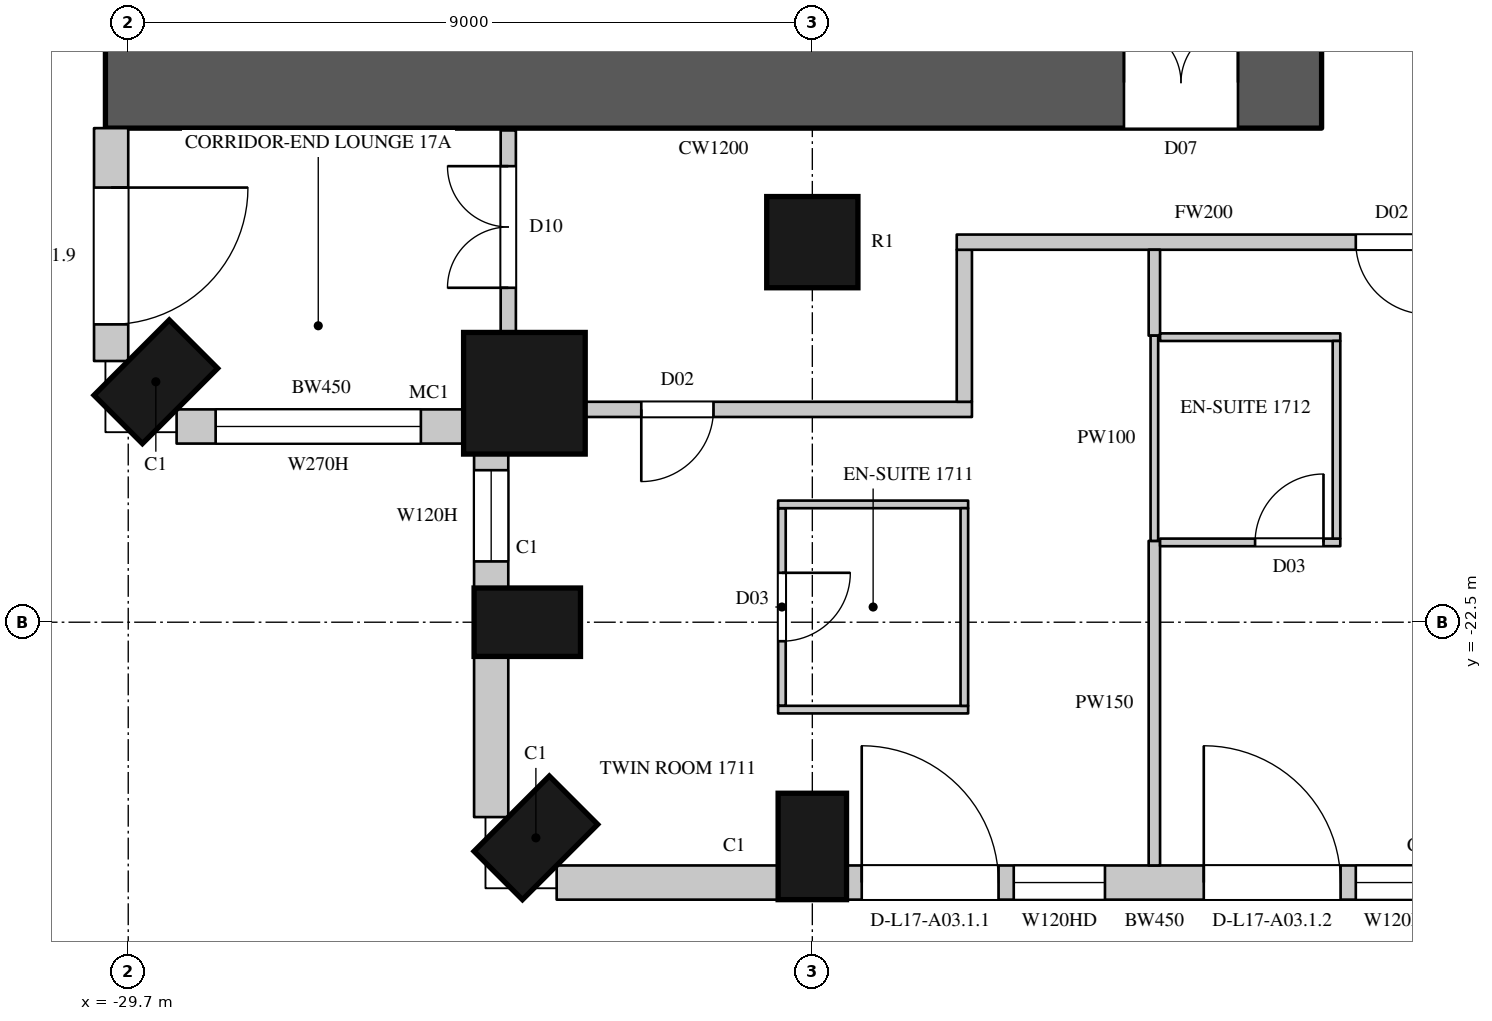
"""IFC4 building model, lengths in metres.
Left out: names, types, materials, properties, quantities, classifications, styles, units other than length and angle.
Written with IfcOpenShell. Run it as: python <this file> out.ifc"""

import sys

from ifc_helpers import new_model, si_unit, direction, frame, frame_2d, origin, origin_2d, place, context, subcontext, project, spatial, rectangle, circle, extrude, element, fill, save


model = new_model("IFC4")
c1 = context("Model", 3, precision=1e-05, world=origin(), true_north=direction((0.0, 1.0)))
c2 = subcontext(c1, "Body", "Model", "MODEL_VIEW")
j1 = project(units=[si_unit("LENGTHUNIT", "METRE"), si_unit("PLANEANGLEUNIT", "RADIAN")], contexts=[c1])
p1 = place(None, origin())
s1 = spatial("IfcSite", under=j1, at=p1, CompositionType="ELEMENT")
p2 = place(p1, origin())
s2 = spatial("IfcBuilding", under=s1, at=p2, CompositionType="ELEMENT")
p3 = place(p2, frame((0.0, 0.0, 91.5)))
s3 = spatial("IfcBuildingStorey", under=s2, at=p3, CompositionType="ELEMENT", Elevation=91.5)
p4 = place(p3, frame((-29.337, -19.337, 0.0), z_axis=(0.0, 0.0, 1.0), x_axis=(0.707106781187, -0.707106781187, 0.0)))
e1 = element("IfcColumn", 1, at=p4, inside=s3, PredefinedType="COLUMN", context=c2, shape_type="SweptSolid", body=[
    extrude(rectangle(XDim=0.9, YDim=1.4, at=origin_2d()), origin(), (0.0, 0.0, 1.0), 3.6),
])
p5 = place(p3, frame((-24.488, -19.488, 0.0), z_axis=(0.0, 0.0, 1.0), x_axis=(1.0, 0.0, 0.0)))
e2 = element("IfcColumn", 2, at=p5, inside=s3, PredefinedType="COLUMN", context=c2, shape_type="SweptSolid", body=[
    extrude(circle(Radius=0.8, at=origin_2d()), origin(), (0.0, 0.0, 1.0), 3.6),
])
for number, where, z_axis, x_axis in (
    (3, (-24.45, -22.5, 0.0), (0.0, 0.0, 1.0), (0.0, -1.0, 0.0)),
    (4, (-24.337, -25.337, 0.0), (0.0, 0.0, 1.0), (0.707, -0.707, 0.0)),
    (5, (-20.7, -25.45, 0.0), (0.0, 0.0, 1.0), (1.0, 0.0, 0.0)),
):
    element("IfcColumn", number, at=place(p3, frame(where, z_axis=z_axis, x_axis=x_axis)), inside=s3, PredefinedType="COLUMN", context=c2, shape_type="SweptSolid", body=[
        extrude(rectangle(XDim=0.9, YDim=1.4, at=origin_2d()), origin(), (0.0, 0.0, 1.0), 3.6),
    ])
p6 = place(p3, frame((-20.7, -17.5, 0.0), z_axis=(0.0, 0.0, 1.0), x_axis=(1.0, 0.0, 0.0)))
e6 = element("IfcColumn", 6, at=p6, inside=s3, PredefinedType="COLUMN", context=c2, shape_type="SweptSolid", body=[
    extrude(circle(Radius=0.6, at=origin_2d()), origin(), (0.0, 0.0, 1.0), 3.6),
])
p7 = place(p3, frame((-29.925, -16.0, 0.0), z_axis=(0.0, 0.0, 1.0), x_axis=(0.0, -1.0, 0.0)))
e7 = element("IfcWall", 7, at=p7, inside=s3, PredefinedType="SOLIDWALL", context=c2, shape_type="SweptSolid", body=[
    extrude(rectangle(XDim=3.064, YDim=0.45, at=frame_2d((1.532, 0.0))), origin(), (0.0, 0.0, 1.0), 3.3),
])
p8 = place(p7, frame((0.782, 0.0, 0.0)))
e8 = element("IfcOpeningElement", 8, at=p8, cuts=e7, PredefinedType="OPENING", context=c2, shape_type="SweptSolid", body=[
    extrude(rectangle(XDim=1.8, YDim=2.4, at=frame_2d((0.9, 1.2))), frame((0.0, 0.235, 0.0), z_axis=(0.0, -1.0, 0.0), x_axis=(1.0, 0.0, 0.0)), (0.0, 0.0, 1.0), 0.47),
])
p9 = place(p3, frame((-29.064, -19.925, 0.0), z_axis=(0.0, 0.0, 1.0), x_axis=(1.0, 0.0, 0.0)))
e9 = element("IfcWall", 9, at=p9, inside=s3, PredefinedType="SOLIDWALL", context=c2, shape_type="SweptSolid", body=[
    extrude(rectangle(XDim=3.805, YDim=0.45, at=frame_2d((1.903, 0.0))), origin(), (0.0, 0.0, 1.0), 3.3),
])
p10 = place(p9, frame((0.514, 0.0, 1.05)))
e10 = element("IfcOpeningElement", 10, at=p10, cuts=e9, PredefinedType="OPENING", context=c2, shape_type="SweptSolid", body=[
    extrude(rectangle(XDim=2.7, YDim=2.0, at=frame_2d((1.35, 1.0))), frame((0.0, 0.235, 0.0), z_axis=(0.0, -1.0, 0.0), x_axis=(1.0, 0.0, 0.0)), (0.0, 0.0, 1.0), 0.47),
])
p11 = place(p3, frame((-24.925, -20.259, 0.0), z_axis=(0.0, 0.0, 1.0), x_axis=(0.0, -1.0, 0.0)))
e11 = element("IfcWall", 11, at=p11, inside=s3, PredefinedType="SOLIDWALL", context=c2, shape_type="SweptSolid", body=[
    extrude(rectangle(XDim=1.792, YDim=0.45, at=frame_2d((0.896, 0.0))), origin(), (0.0, 0.0, 1.0), 3.3),
])
p12 = place(p11, frame((0.241, 0.0, 1.05)))
e12 = element("IfcOpeningElement", 12, at=p12, cuts=e11, PredefinedType="OPENING", context=c2, shape_type="SweptSolid", body=[
    extrude(rectangle(XDim=1.2, YDim=2.0, at=frame_2d((0.6, 1.0))), frame((0.0, 0.235, 0.0), z_axis=(0.0, -1.0, 0.0), x_axis=(1.0, 0.0, 0.0)), (0.0, 0.0, 1.0), 0.47),
])
p13 = place(p3, frame((-24.925, -22.95, 0.0), z_axis=(0.0, 0.0, 1.0), x_axis=(0.0, -1.0, 0.0)))
e13 = element("IfcWall", 13, at=p13, inside=s3, PredefinedType="SOLIDWALL", context=c2, shape_type="SweptSolid", body=[
    extrude(rectangle(XDim=2.114, YDim=0.45, at=frame_2d((1.057, 0.0))), origin(), (0.0, 0.0, 1.0), 3.3),
])
p14 = place(p3, frame((-24.064, -25.925, 0.0), z_axis=(0.0, 0.0, 1.0), x_axis=(1.0, 0.0, 0.0)))
e14 = element("IfcWall", 14, at=p14, inside=s3, PredefinedType="SOLIDWALL", context=c2, shape_type="SweptSolid", body=[
    extrude(rectangle(XDim=2.914, YDim=0.45, at=frame_2d((1.457, 0.0))), origin(), (0.0, 0.0, 1.0), 3.3),
])
p15 = place(p3, frame((-20.25, -25.925, 0.0), z_axis=(0.0, 0.0, 1.0), x_axis=(1.0, 0.0, 0.0)))
e15 = element("IfcWall", 15, at=p15, inside=s3, PredefinedType="SOLIDWALL", context=c2, shape_type="SweptSolid", body=[
    extrude(rectangle(XDim=8.1, YDim=0.45, at=frame_2d((4.05, 0.0))), origin(), (0.0, 0.0, 1.0), 3.3),
])
p16 = place(p15, frame((0.2, 0.0, 0.0)))
e16 = element("IfcOpeningElement", 16, at=p16, cuts=e15, PredefinedType="OPENING", context=c2, shape_type="SweptSolid", body=[
    extrude(rectangle(XDim=1.8, YDim=2.4, at=frame_2d((0.9, 1.2))), frame((0.0, 0.235, 0.0), z_axis=(0.0, -1.0, 0.0), x_axis=(1.0, 0.0, 0.0)), (0.0, 0.0, 1.0), 0.47),
])
p17 = place(p15, frame((2.2, 0.0, 1.05)))
e17 = element("IfcOpeningElement", 17, at=p17, cuts=e15, PredefinedType="OPENING", context=c2, shape_type="SweptSolid", body=[
    extrude(rectangle(XDim=1.2, YDim=2.0, at=frame_2d((0.6, 1.0))), frame((0.0, 0.235, 0.0), z_axis=(0.0, -1.0, 0.0), x_axis=(1.0, 0.0, 0.0)), (0.0, 0.0, 1.0), 0.47),
])
p18 = place(p15, frame((4.7, 0.0, 0.0)))
e18 = element("IfcOpeningElement", 18, at=p18, cuts=e15, PredefinedType="OPENING", context=c2, shape_type="SweptSolid", body=[
    extrude(rectangle(XDim=1.8, YDim=2.4, at=frame_2d((0.9, 1.2))), frame((0.0, 0.235, 0.0), z_axis=(0.0, -1.0, 0.0), x_axis=(1.0, 0.0, 0.0)), (0.0, 0.0, 1.0), 0.47),
])
p19 = place(p15, frame((6.7, 0.0, 1.05)))
e19 = element("IfcOpeningElement", 19, at=p19, cuts=e15, PredefinedType="OPENING", context=c2, shape_type="SweptSolid", body=[
    extrude(rectangle(XDim=1.2, YDim=2.0, at=frame_2d((0.6, 1.0))), frame((0.0, 0.235, 0.0), z_axis=(0.0, -1.0, 0.0), x_axis=(1.0, 0.0, 0.0)), (0.0, 0.0, 1.0), 0.47),
])
p20 = place(p3, frame((-30.0, -15.4, 0.0), z_axis=(0.0, 0.0, 1.0), x_axis=(1.0, 0.0, 0.0)))
e20 = element("IfcWall", 20, at=p20, inside=s3, PredefinedType="SHEAR", context=c2, shape_type="SweptSolid", body=[
    extrude(rectangle(XDim=16.0, YDim=1.2, at=frame_2d((8.0, 0.0))), origin(), (0.0, 0.0, 1.0), 3.6),
])
p21 = place(p20, frame((13.4, 0.0, 0.0)))
e21 = element("IfcOpeningElement", 21, at=p21, cuts=e20, PredefinedType="OPENING", context=c2, shape_type="SweptSolid", body=[
    extrude(rectangle(XDim=1.5, YDim=2.4, at=frame_2d((0.75, 1.2))), frame((0.0, 0.61, 0.0), z_axis=(0.0, -1.0, 0.0), x_axis=(1.0, 0.0, 0.0)), (0.0, 0.0, 1.0), 1.22),
])
p22 = place(p3, frame((-24.7, -18.7, 0.0), z_axis=(0.0, 0.0, 1.0), x_axis=(0.0, 1.0, 0.0)))
e22 = element("IfcWall", 22, at=p22, inside=s3, PredefinedType="PARTITIONING", context=c2, shape_type="SweptSolid", body=[
    extrude(rectangle(XDim=2.67, YDim=0.2, at=frame_2d((1.335, 0.0))), origin(), (0.0, 0.0, 1.0), 3.3),
])
p23 = place(p22, frame((0.6, 0.0, 0.0)))
e23 = element("IfcOpeningElement", 23, at=p23, cuts=e22, PredefinedType="OPENING", context=c2, shape_type="SweptSolid", body=[
    extrude(rectangle(XDim=1.6, YDim=2.4, at=frame_2d((0.8, 1.2))), frame((0.0, 0.11, 0.0), z_axis=(0.0, -1.0, 0.0), x_axis=(1.0, 0.0, 0.0)), (0.0, 0.0, 1.0), 0.22),
])
p24 = place(p3, frame((-23.7, -19.7, 0.0), z_axis=(0.0, 0.0, 1.0), x_axis=(1.0, 0.0, 0.0)))
e24 = element("IfcWall", 24, at=p24, inside=s3, PredefinedType="PARTITIONING", context=c2, shape_type="SweptSolid", body=[
    extrude(rectangle(XDim=5.1, YDim=0.2, at=frame_2d((2.55, 0.0))), origin(), (0.0, 0.0, 1.0), 3.3),
])
p25 = place(p24, frame((0.75, 0.0, 0.0)))
e25 = element("IfcOpeningElement", 25, at=p25, cuts=e24, PredefinedType="OPENING", context=c2, shape_type="SweptSolid", body=[
    extrude(rectangle(XDim=0.95, YDim=2.2, at=frame_2d((0.475, 1.1))), frame((0.0, 0.11, 0.0), z_axis=(0.0, -1.0, 0.0), x_axis=(1.0, 0.0, 0.0)), (0.0, 0.0, 1.0), 0.22),
])
p26 = place(p3, frame((-18.7, -19.6, 0.0), z_axis=(0.0, 0.0, 1.0), x_axis=(0.0, 1.0, 0.0)))
e26 = element("IfcWall", 26, at=p26, inside=s3, PredefinedType="PARTITIONING", context=c2, shape_type="SweptSolid", body=[
    extrude(rectangle(XDim=2.0, YDim=0.2, at=frame_2d((1.0, 0.0))), origin(), (0.0, 0.0, 1.0), 3.3),
])
p27 = place(p3, frame((-18.8, -17.5, 0.0), z_axis=(0.0, 0.0, 1.0), x_axis=(1.0, 0.0, 0.0)))
e27 = element("IfcWall", 27, at=p27, inside=s3, PredefinedType="PARTITIONING", context=c2, shape_type="SweptSolid", body=[
    extrude(rectangle(XDim=6.5, YDim=0.2, at=frame_2d((3.25, 0.0))), origin(), (0.0, 0.0, 1.0), 2.75),
])
p28 = place(p27, frame((5.25, 0.0, 0.0)))
e28 = element("IfcOpeningElement", 28, at=p28, cuts=e27, PredefinedType="OPENING", context=c2, shape_type="SweptSolid", body=[
    extrude(rectangle(XDim=0.95, YDim=2.2, at=frame_2d((0.475, 1.1))), frame((0.0, 0.11, 0.0), z_axis=(0.0, -1.0, 0.0), x_axis=(1.0, 0.0, 0.0)), (0.0, 0.0, 1.0), 0.22),
])
p29 = place(p3, frame((-16.2, -25.7, 0.0), z_axis=(0.0, 0.0, 1.0), x_axis=(0.0, 1.0, 0.0)))
e29 = element("IfcWall", 29, at=p29, inside=s3, PredefinedType="PARTITIONING", context=c2, shape_type="SweptSolid", body=[
    extrude(rectangle(XDim=4.27, YDim=0.15, at=frame_2d((2.135, 0.0))), origin(), (0.0, 0.0, 1.0), 2.65),
])
p30 = place(p3, frame((-16.2, -18.73, 0.0), z_axis=(0.0, 0.0, 1.0), x_axis=(0.0, 1.0, 0.0)))
e30 = element("IfcWall", 30, at=p30, inside=s3, PredefinedType="PARTITIONING", context=c2, shape_type="SweptSolid", body=[
    extrude(rectangle(XDim=1.13, YDim=0.15, at=frame_2d((0.565, 0.0))), origin(), (0.0, 0.0, 1.0), 2.65),
])
p31 = place(p3, frame((-21.1, -23.6, 0.0), z_axis=(0.0, 0.0, 1.0), x_axis=(0.0, 1.0, 0.0)))
e31 = element("IfcWall", 31, at=p31, inside=s3, PredefinedType="PARTITIONING", context=c2, shape_type="SweptSolid", body=[
    extrude(rectangle(XDim=2.6, YDim=0.1, at=frame_2d((1.3, 0.0))), origin(), (0.0, 0.0, 1.0), 3.3),
])
p32 = place(p31, frame((0.85, 0.0, 0.0)))
e32 = element("IfcOpeningElement", 32, at=p32, cuts=e31, PredefinedType="OPENING", context=c2, shape_type="SweptSolid", body=[
    extrude(rectangle(XDim=0.9, YDim=2.2, at=frame_2d((0.45, 1.1))), frame((0.0, 0.06, 0.0), z_axis=(0.0, -1.0, 0.0), x_axis=(1.0, 0.0, 0.0)), (0.0, 0.0, 1.0), 0.12),
])
for number, where, z_axis, x_axis in (
    (33, (-21.15, -23.65, 0.0), (0.0, 0.0, 1.0), (1.0, 0.0, 0.0)),
    (34, (-21.15, -20.95, 0.0), (0.0, 0.0, 1.0), (1.0, 0.0, 0.0)),
):
    element("IfcWall", number, at=place(p3, frame(where, z_axis=z_axis, x_axis=x_axis)), inside=s3, PredefinedType="PARTITIONING", context=c2, shape_type="SweptSolid", body=[
        extrude(rectangle(XDim=2.5, YDim=0.1, at=frame_2d((1.25, 0.0))), origin(), (0.0, 0.0, 1.0), 3.3),
    ])
p33 = place(p3, frame((-18.7, -23.6, 0.0), z_axis=(0.0, 0.0, 1.0), x_axis=(0.0, 1.0, 0.0)))
e35 = element("IfcWall", 35, at=p33, inside=s3, PredefinedType="PARTITIONING", context=c2, shape_type="SweptSolid", body=[
    extrude(rectangle(XDim=2.6, YDim=0.1, at=frame_2d((1.3, 0.0))), origin(), (0.0, 0.0, 1.0), 3.3),
])
p34 = place(p3, frame((-16.2, -21.43, 0.0), z_axis=(0.0, 0.0, 1.0), x_axis=(0.0, 1.0, 0.0)))
e36 = element("IfcWall", 36, at=p34, inside=s3, PredefinedType="PARTITIONING", context=c2, shape_type="SweptSolid", body=[
    extrude(rectangle(XDim=2.7, YDim=0.1, at=frame_2d((1.35, 0.0))), origin(), (0.0, 0.0, 1.0), 2.65),
])
p35 = place(p3, frame((-16.125, -21.45, 0.0), z_axis=(0.0, 0.0, 1.0), x_axis=(1.0, 0.0, 0.0)))
e37 = element("IfcWall", 37, at=p35, inside=s3, PredefinedType="PARTITIONING", context=c2, shape_type="SweptSolid", body=[
    extrude(rectangle(XDim=2.371, YDim=0.1, at=frame_2d((1.186, 0.0))), origin(), (0.0, 0.0, 1.0), 3.3),
])
p36 = place(p35, frame((1.25, 0.0, 0.0)))
e38 = element("IfcOpeningElement", 38, at=p36, cuts=e37, PredefinedType="OPENING", context=c2, shape_type="SweptSolid", body=[
    extrude(rectangle(XDim=0.9, YDim=2.2, at=frame_2d((0.45, 1.1))), frame((0.0, 0.06, 0.0), z_axis=(0.0, -1.0, 0.0), x_axis=(1.0, 0.0, 0.0)), (0.0, 0.0, 1.0), 0.12),
])
p37 = place(p3, frame((-16.125, -18.75, 0.0), z_axis=(0.0, 0.0, 1.0), x_axis=(1.0, 0.0, 0.0)))
e39 = element("IfcWall", 39, at=p37, inside=s3, PredefinedType="PARTITIONING", context=c2, shape_type="SweptSolid", body=[
    extrude(rectangle(XDim=2.371, YDim=0.1, at=frame_2d((1.186, 0.0))), origin(), (0.0, 0.0, 1.0), 3.3),
])
p38 = place(p3, frame((-13.804, -21.4, 0.0), z_axis=(0.0, 0.0, 1.0), x_axis=(0.0, 1.0, 0.0)))
e40 = element("IfcWall", 40, at=p38, inside=s3, PredefinedType="PARTITIONING", context=c2, shape_type="SweptSolid", body=[
    extrude(rectangle(XDim=2.6, YDim=0.1, at=frame_2d((1.3, 0.0))), origin(), (0.0, 0.0, 1.0), 3.3),
])
p39 = place(p8, origin())
e41 = element("IfcDoor", 41, at=p39, inside=s3, OperationType="SLIDING_TO_LEFT", PredefinedType="DOOR", context=c2, shape_type="SweptSolid", body=[
    extrude(rectangle(XDim=1.8, YDim=2.4, at=frame_2d((0.9, 1.2))), frame((0.0, 0.13, 0.0), z_axis=(0.0, -1.0, 0.0), x_axis=(1.0, 0.0, 0.0)), (0.0, 0.0, 1.0), 0.05),
])
fill(e8, e41)
p40 = place(p10, origin())
e42 = element("IfcWindow", 42, at=p40, inside=s3, PartitioningType="SINGLE_PANEL", PredefinedType="WINDOW", context=c2, shape_type="SweptSolid", body=[
    extrude(rectangle(XDim=2.7, YDim=2.0, at=frame_2d((1.35, 1.0))), frame((0.0, 0.135, 0.0), z_axis=(0.0, -1.0, 0.0), x_axis=(1.0, 0.0, 0.0)), (0.0, 0.0, 1.0), 0.06),
])
fill(e10, e42)
p41 = place(p12, origin())
e43 = element("IfcWindow", 43, at=p41, inside=s3, PartitioningType="SINGLE_PANEL", PredefinedType="WINDOW", context=c2, shape_type="SweptSolid", body=[
    extrude(rectangle(XDim=1.2, YDim=2.0, at=frame_2d((0.6, 1.0))), frame((0.0, 0.135, 0.0), z_axis=(0.0, -1.0, 0.0), x_axis=(1.0, 0.0, 0.0)), (0.0, 0.0, 1.0), 0.06),
])
fill(e12, e43)
p42 = place(p16, origin())
e44 = element("IfcDoor", 44, at=p42, inside=s3, OperationType="SLIDING_TO_LEFT", PredefinedType="DOOR", context=c2, shape_type="SweptSolid", body=[
    extrude(rectangle(XDim=1.8, YDim=2.4, at=frame_2d((0.9, 1.2))), frame((0.0, 0.13, 0.0), z_axis=(0.0, -1.0, 0.0), x_axis=(1.0, 0.0, 0.0)), (0.0, 0.0, 1.0), 0.05),
])
fill(e16, e44)
p43 = place(p17, origin())
e45 = element("IfcWindow", 45, at=p43, inside=s3, PartitioningType="SINGLE_PANEL", PredefinedType="WINDOW", context=c2, shape_type="SweptSolid", body=[
    extrude(rectangle(XDim=1.2, YDim=2.0, at=frame_2d((0.6, 1.0))), frame((0.0, 0.135, 0.0), z_axis=(0.0, -1.0, 0.0), x_axis=(1.0, 0.0, 0.0)), (0.0, 0.0, 1.0), 0.06),
])
fill(e17, e45)
p44 = place(p18, origin())
e46 = element("IfcDoor", 46, at=p44, inside=s3, OperationType="SLIDING_TO_LEFT", PredefinedType="DOOR", context=c2, shape_type="SweptSolid", body=[
    extrude(rectangle(XDim=1.8, YDim=2.4, at=frame_2d((0.9, 1.2))), frame((0.0, 0.13, 0.0), z_axis=(0.0, -1.0, 0.0), x_axis=(1.0, 0.0, 0.0)), (0.0, 0.0, 1.0), 0.05),
])
fill(e18, e46)
p45 = place(p19, origin())
e47 = element("IfcWindow", 47, at=p45, inside=s3, PartitioningType="SINGLE_PANEL", PredefinedType="WINDOW", context=c2, shape_type="SweptSolid", body=[
    extrude(rectangle(XDim=1.2, YDim=2.0, at=frame_2d((0.6, 1.0))), frame((0.0, 0.135, 0.0), z_axis=(0.0, -1.0, 0.0), x_axis=(1.0, 0.0, 0.0)), (0.0, 0.0, 1.0), 0.06),
])
fill(e19, e47)
p46 = place(p23, origin())
e48 = element("IfcDoor", 48, at=p46, inside=s3, OperationType="DOUBLE_DOOR_SINGLE_SWING", PredefinedType="DOOR", context=c2, shape_type="SweptSolid", body=[
    extrude(rectangle(XDim=1.6, YDim=2.4, at=frame_2d((0.8, 1.2))), frame((0.0, 0.025, 0.0), z_axis=(0.0, -1.0, 0.0), x_axis=(1.0, 0.0, 0.0)), (0.0, 0.0, 1.0), 0.05),
])
fill(e23, e48)
p47 = place(p25, origin())
e49 = element("IfcDoor", 49, at=p47, inside=s3, OperationType="SINGLE_SWING_RIGHT", PredefinedType="DOOR", context=c2, shape_type="SweptSolid", body=[
    extrude(rectangle(XDim=0.95, YDim=2.2, at=frame_2d((0.475, 1.1))), frame((0.0, 0.025, 0.0), z_axis=(0.0, -1.0, 0.0), x_axis=(1.0, 0.0, 0.0)), (0.0, 0.0, 1.0), 0.05),
])
fill(e25, e49)
p48 = place(p32, origin())
e50 = element("IfcDoor", 50, at=p48, inside=s3, OperationType="SINGLE_SWING_LEFT", PredefinedType="DOOR", context=c2, shape_type="SweptSolid", body=[
    extrude(rectangle(XDim=0.9, YDim=2.2, at=frame_2d((0.45, 1.1))), frame((0.0, 0.025, 0.0), z_axis=(0.0, -1.0, 0.0), x_axis=(1.0, 0.0, 0.0)), (0.0, 0.0, 1.0), 0.05),
])
fill(e32, e50)
p49 = place(p28, origin())
e51 = element("IfcDoor", 51, at=p49, inside=s3, OperationType="SINGLE_SWING_LEFT", PredefinedType="DOOR", context=c2, shape_type="SweptSolid", body=[
    extrude(rectangle(XDim=0.95, YDim=2.2, at=frame_2d((0.475, 1.1))), frame((0.0, 0.025, 0.0), z_axis=(0.0, -1.0, 0.0), x_axis=(1.0, 0.0, 0.0)), (0.0, 0.0, 1.0), 0.05),
])
fill(e28, e51)
p50 = place(p36, origin())
e52 = element("IfcDoor", 52, at=p50, inside=s3, OperationType="SINGLE_SWING_RIGHT", PredefinedType="DOOR", context=c2, shape_type="SweptSolid", body=[
    extrude(rectangle(XDim=0.9, YDim=2.2, at=frame_2d((0.45, 1.1))), frame((0.0, 0.025, 0.0), z_axis=(0.0, -1.0, 0.0), x_axis=(1.0, 0.0, 0.0)), (0.0, 0.0, 1.0), 0.05),
])
fill(e38, e52)
p51 = place(p21, origin())
e53 = element("IfcDoor", 53, at=p51, inside=s3, OperationType="DOUBLE_DOOR_SINGLE_SWING", PredefinedType="DOOR", context=c2, shape_type="SweptSolid", body=[
    extrude(rectangle(XDim=1.5, YDim=2.4, at=frame_2d((0.75, 1.2))), frame((0.0, 0.025, 0.0), z_axis=(0.0, -1.0, 0.0), x_axis=(1.0, 0.0, 0.0)), (0.0, 0.0, 1.0), 0.05),
])
fill(e21, e53)
save(model, sys.argv[1])
